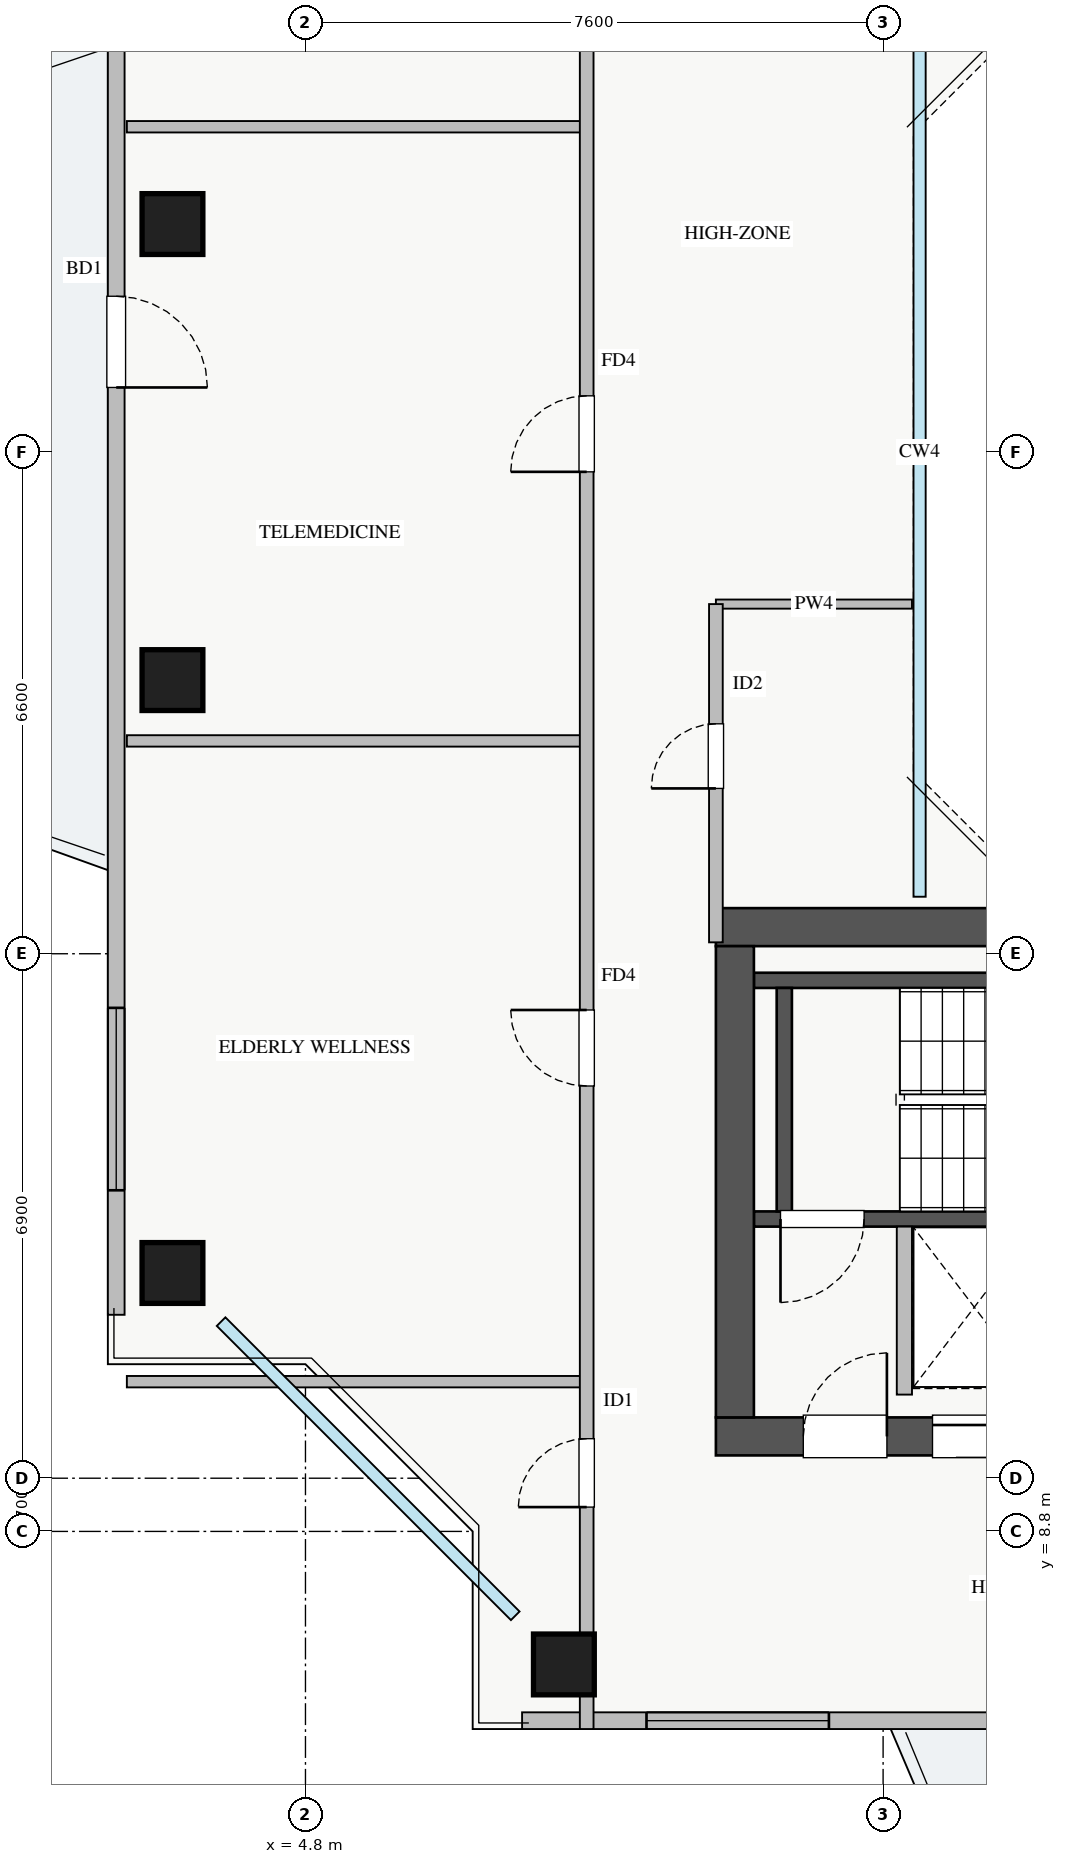
"""IFC4 building model, lengths in metres.
Left out: names, types, materials, properties, quantities, classifications, styles, units other than length and angle.
Written with IfcOpenShell. Run it as: python <this file> out.ifc"""

import sys

from ifc_helpers import new_model, si_unit, direction, frame, frame_2d, origin, origin_2d, place, context, subcontext, project, spatial, rectangle, extrude, source, transform, mapped, element, fill, save


model = new_model("IFC4")
c1 = context("Model", 3, precision=1e-05, world=origin(), true_north=direction((0.0, 1.0)))
c2 = subcontext(c1, "Body", "Model", "MODEL_VIEW")
j1 = project(units=[si_unit("LENGTHUNIT", "METRE"), si_unit("PLANEANGLEUNIT", "RADIAN")], contexts=[c1])
p1 = place(None, origin())
s1 = spatial("IfcSite", under=j1, at=p1, CompositionType="ELEMENT")
p2 = place(p1, origin())
s2 = spatial("IfcBuilding", under=s1, at=p2, CompositionType="ELEMENT")
p3 = place(p2, frame((0.0, 0.0, 219.75)))
s3 = spatial("IfcBuildingStorey", under=s2, at=p3, CompositionType="ELEMENT", Elevation=219.75)
p4 = place(p3, frame((12.68, 12.8, 0.0), z_axis=(0.0, 0.0, 1.0), x_axis=(1.0, 0.0, 0.0)))
e1 = element("IfcWall", 1, at=p4, inside=s3, PredefinedType="SHEAR", context=c2, shape_type="SweptSolid", body=[
    extrude(rectangle(XDim=1.94, YDim=0.18, at=frame_2d((0.97, 0.0))), origin(), (0.0, 0.0, 1.0), 3.07),
])
p5 = place(p3, frame((10.7, 12.91, 0.0), z_axis=(0.0, 0.0, 1.0), x_axis=(1.0, 0.0, 0.0)))
e2 = element("IfcWall", 2, at=p5, inside=s3, PredefinedType="SHEAR", context=c2, shape_type="SweptSolid", body=[
    extrude(rectangle(XDim=7.45, YDim=0.2, at=frame_2d((3.725, 0.0))), origin(), (0.0, 0.0, 1.0), 3.25),
])
p6 = place(p5, frame((0.35, 0.0, 0.0)))
e3 = element("IfcOpeningElement", 3, at=p6, cuts=e2, PredefinedType="OPENING", context=c2, shape_type="SweptSolid", body=[
    extrude(rectangle(XDim=1.1, YDim=2.05, at=frame_2d((0.55, 1.025))), frame((0.0, 0.11, 0.0), z_axis=(0.0, -1.0, 0.0), x_axis=(1.0, 0.0, 0.0)), (0.0, 0.0, 1.0), 0.22),
])
p7 = place(p3, frame((10.7, 16.05, 0.0), z_axis=(0.0, 0.0, 1.0), x_axis=(1.0, 0.0, 0.0)))
e4 = element("IfcWall", 4, at=p7, inside=s3, PredefinedType="SHEAR", context=c2, shape_type="SweptSolid", body=[
    extrude(rectangle(XDim=7.45, YDim=0.2, at=frame_2d((3.725, 0.0))), origin(), (0.0, 0.0, 1.0), 3.25),
])
p8 = place(p3, frame((11.1, 13.01, 0.0), z_axis=(0.0, 0.0, 1.0), x_axis=(0.0, 1.0, 0.0)))
e5 = element("IfcWall", 5, at=p8, inside=s3, PredefinedType="SHEAR", context=c2, shape_type="SweptSolid", body=[
    extrude(rectangle(XDim=2.94, YDim=0.2, at=frame_2d((1.47, 0.0))), origin(), (0.0, 0.0, 1.0), 3.25),
])
p9 = place(p3, frame((10.2, 10.05, 0.0), z_axis=(0.0, 0.0, 1.0), x_axis=(1.0, 0.0, 0.0)))
e6 = element("IfcWall", 6, at=p9, inside=s3, PredefinedType="SHEAR", context=c2, shape_type="SweptSolid", body=[
    extrude(rectangle(XDim=17.6, YDim=0.5, at=frame_2d((8.8, 0.0))), origin(), (0.0, 0.0, 1.0), 3.25),
])
p10 = place(p9, frame((1.15, 0.0, 0.0)))
e7 = element("IfcOpeningElement", 7, at=p10, cuts=e6, PredefinedType="OPENING", context=c2, shape_type="SweptSolid", body=[
    extrude(rectangle(XDim=1.1, YDim=2.05, at=frame_2d((0.55, 1.025))), frame((0.0, 0.26, 0.0), z_axis=(0.0, -1.0, 0.0), x_axis=(1.0, 0.0, 0.0)), (0.0, 0.0, 1.0), 0.52),
])
p11 = place(p9, frame((8.3, 0.0, 0.0)))
e8 = element("IfcOpeningElement", 8, at=p11, cuts=e6, PredefinedType="OPENING", context=c2, shape_type="SweptSolid", body=[
    extrude(rectangle(XDim=1.1, YDim=2.05, at=frame_2d((0.55, 1.025))), frame((0.0, 0.26, 0.0), z_axis=(0.0, -1.0, 0.0), x_axis=(1.0, 0.0, 0.0)), (0.0, 0.0, 1.0), 0.52),
])
p12 = place(p9, frame((2.85, 0.0, 0.0)))
e9 = element("IfcOpeningElement", 9, at=p12, cuts=e6, PredefinedType="OPENING", context=c2, shape_type="SweptSolid", body=[
    extrude(rectangle(XDim=1.1, YDim=2.05, at=frame_2d((0.55, 1.025))), frame((0.0, 0.26, 0.0), z_axis=(0.0, -1.0, 0.0), x_axis=(1.0, 0.0, 0.0)), (0.0, 0.0, 1.0), 0.52),
])
p13 = place(p9, frame((5.8, 0.0, 0.0)))
e10 = element("IfcOpeningElement", 10, at=p13, cuts=e6, PredefinedType="OPENING", context=c2, shape_type="SweptSolid", body=[
    extrude(rectangle(XDim=1.0, YDim=2.05, at=frame_2d((0.5, 1.025))), frame((0.0, 0.26, 0.0), z_axis=(0.0, -1.0, 0.0), x_axis=(1.0, 0.0, 0.0)), (0.0, 0.0, 1.0), 0.52),
])
p14 = place(p9, frame((14.74, 0.0, 0.0)))
e11 = element("IfcOpeningElement", 11, at=p14, cuts=e6, PredefinedType="OPENING", context=c2, shape_type="SweptSolid", body=[
    extrude(rectangle(XDim=1.0, YDim=2.05, at=frame_2d((0.5, 1.025))), frame((0.0, 0.26, 0.0), z_axis=(0.0, -1.0, 0.0), x_axis=(1.0, 0.0, 0.0)), (0.0, 0.0, 1.0), 0.52),
])
p15 = place(p9, frame((10.64, 0.0, 0.0)))
e12 = element("IfcOpeningElement", 12, at=p15, cuts=e6, PredefinedType="OPENING", context=c2, shape_type="SweptSolid", body=[
    extrude(rectangle(XDim=1.0, YDim=2.05, at=frame_2d((0.5, 1.025))), frame((0.0, 0.26, 0.0), z_axis=(0.0, -1.0, 0.0), x_axis=(1.0, 0.0, 0.0)), (0.0, 0.0, 1.0), 0.52),
])
p16 = place(p9, frame((13.09, 0.0, 0.0)))
e13 = element("IfcOpeningElement", 13, at=p16, cuts=e6, PredefinedType="OPENING", context=c2, shape_type="SweptSolid", body=[
    extrude(rectangle(XDim=1.0, YDim=2.05, at=frame_2d((0.5, 1.025))), frame((0.0, 0.26, 0.0), z_axis=(0.0, -1.0, 0.0), x_axis=(1.0, 0.0, 0.0)), (0.0, 0.0, 1.0), 0.52),
])
p17 = place(p3, frame((10.2, 16.75, 0.0), z_axis=(0.0, 0.0, 1.0), x_axis=(1.0, 0.0, 0.0)))
e14 = element("IfcWall", 14, at=p17, inside=s3, PredefinedType="SHEAR", context=c2, shape_type="SweptSolid", body=[
    extrude(rectangle(XDim=17.6, YDim=0.5, at=frame_2d((8.8, 0.0))), origin(), (0.0, 0.0, 1.0), 3.25),
])
p18 = place(p3, frame((10.45, 10.3, 0.0), z_axis=(0.0, 0.0, 1.0), x_axis=(0.0, 1.0, 0.0)))
e15 = element("IfcWall", 15, at=p18, inside=s3, PredefinedType="SHEAR", context=c2, shape_type="SweptSolid", body=[
    extrude(rectangle(XDim=6.2, YDim=0.5, at=frame_2d((3.1, 0.0))), origin(), (0.0, 0.0, 1.0), 3.25),
])
m1 = source(origin(), c2, "Body", "SweptSolid", [
    extrude(rectangle(XDim=0.8, YDim=0.8, at=origin_2d()), origin(), (0.0, 0.0, 1.0), 3.25),
])
for number, where, z_axis, x_axis in (
    (16, (8.2, 7.05, 0.0), (0.0, 0.0, 1.0), (1.0, 0.0, 0.0)),
    (17, (3.05, 26.0, 0.0), (0.0, 0.0, 1.0), (1.0, 0.0, 0.0)),
    (18, (3.05, 20.0, 0.0), (0.0, 0.0, 1.0), (1.0, 0.0, 0.0)),
    (19, (3.05, 12.2, 0.0), (0.0, 0.0, 1.0), (1.0, 0.0, 0.0)),
):
    element("IfcColumn", number, at=place(p3, frame(where, z_axis=z_axis, x_axis=x_axis)), inside=s3, PredefinedType="COLUMN", context=c2, shape_type="MappedRepresentation", body=[
        mapped(m1, transform((0.0, 0.0, 0.0), x_axis=(1.0, 0.0, 0.0), y_axis=(0.0, 1.0, 0.0), z_axis=(0.0, 0.0, 1.0), scale=1.0)),
    ])
p19 = place(p3, frame((7.65, 6.31, 0.0), z_axis=(0.0, 0.0, 1.0), x_axis=(1.0, 0.0, 0.0)))
e20 = element("IfcWall", 20, at=p19, inside=s3, PredefinedType="STANDARD", context=c2, shape_type="SweptSolid", body=[
    extrude(rectangle(XDim=22.7, YDim=0.22, at=frame_2d((11.35, 0.0))), origin(), (0.0, 0.0, 1.0), 2.61),
])
p20 = place(p19, frame((12.2, 0.0, 0.0)))
e21 = element("IfcOpeningElement", 21, at=p20, cuts=e20, PredefinedType="OPENING", context=c2, shape_type="SweptSolid", body=[
    extrude(rectangle(XDim=1.2, YDim=2.1, at=frame_2d((0.6, 1.05))), frame((0.0, 0.12, 0.0), z_axis=(0.0, -1.0, 0.0), x_axis=(1.0, 0.0, 0.0)), (0.0, 0.0, 1.0), 0.24),
])
p21 = place(p19, frame((1.637, 0.0, 0.9)))
e22 = element("IfcOpeningElement", 22, at=p21, cuts=e20, PredefinedType="OPENING", context=c2, shape_type="SweptSolid", body=[
    extrude(rectangle(XDim=2.4, YDim=1.48, at=frame_2d((1.2, 0.74))), frame((0.0, 0.12, 0.0), z_axis=(0.0, -1.0, 0.0), x_axis=(1.0, 0.0, 0.0)), (0.0, 0.0, 1.0), 0.24),
])
p22 = place(p19, frame((7.612, 0.0, 0.9)))
e23 = element("IfcOpeningElement", 23, at=p22, cuts=e20, PredefinedType="OPENING", context=c2, shape_type="SweptSolid", body=[
    extrude(rectangle(XDim=1.8, YDim=1.45, at=frame_2d((0.9, 0.725))), frame((0.0, 0.12, 0.0), z_axis=(0.0, -1.0, 0.0), x_axis=(1.0, 0.0, 0.0)), (0.0, 0.0, 1.0), 0.24),
])
p23 = place(p19, frame((20.137, 0.0, 0.9)))
e24 = element("IfcOpeningElement", 24, at=p23, cuts=e20, PredefinedType="OPENING", context=c2, shape_type="SweptSolid", body=[
    extrude(rectangle(XDim=2.1, YDim=1.5, at=frame_2d((1.05, 0.75))), frame((0.0, 0.12, 0.0), z_axis=(0.0, -1.0, 0.0), x_axis=(1.0, 0.0, 0.0)), (0.0, 0.0, 1.0), 0.24),
])
p24 = place(p19, frame((16.72, 0.0, 0.9)))
e25 = element("IfcOpeningElement", 25, at=p24, cuts=e20, PredefinedType="OPENING", context=c2, shape_type="SweptSolid", body=[
    extrude(rectangle(XDim=2.4, YDim=1.5, at=frame_2d((1.2, 0.75))), frame((0.0, 0.12, 0.0), z_axis=(0.0, -1.0, 0.0), x_axis=(1.0, 0.0, 0.0)), (0.0, 0.0, 1.0), 0.24),
])
p25 = place(p3, frame((2.31, 11.65, 0.0), z_axis=(0.0, 0.0, 1.0), x_axis=(0.0, 1.0, 0.0)))
e26 = element("IfcWall", 26, at=p25, inside=s3, PredefinedType="STANDARD", context=c2, shape_type="SweptSolid", body=[
    extrude(rectangle(XDim=22.7, YDim=0.22, at=frame_2d((11.35, 0.0))), origin(), (0.0, 0.0, 1.0), 2.61),
])
p26 = place(p25, frame((12.2, 0.0, 0.0)))
e27 = element("IfcOpeningElement", 27, at=p26, cuts=e26, PredefinedType="OPENING", context=c2, shape_type="SweptSolid", body=[
    extrude(rectangle(XDim=1.2, YDim=2.1, at=frame_2d((0.6, 1.05))), frame((0.0, 0.12, 0.0), z_axis=(0.0, -1.0, 0.0), x_axis=(1.0, 0.0, 0.0)), (0.0, 0.0, 1.0), 0.24),
])
p27 = place(p25, frame((1.638, 0.0, 0.9)))
e28 = element("IfcOpeningElement", 28, at=p27, cuts=e26, PredefinedType="OPENING", context=c2, shape_type="SweptSolid", body=[
    extrude(rectangle(XDim=2.4, YDim=1.48, at=frame_2d((1.2, 0.74))), frame((0.0, 0.12, 0.0), z_axis=(0.0, -1.0, 0.0), x_axis=(1.0, 0.0, 0.0)), (0.0, 0.0, 1.0), 0.24),
])
p28 = place(p25, frame((18.813, 0.0, 0.9)))
e29 = element("IfcOpeningElement", 29, at=p28, cuts=e26, PredefinedType="OPENING", context=c2, shape_type="SweptSolid", body=[
    extrude(rectangle(XDim=2.1, YDim=1.48, at=frame_2d((1.05, 0.74))), frame((0.0, 0.12, 0.0), z_axis=(0.0, -1.0, 0.0), x_axis=(1.0, 0.0, 0.0)), (0.0, 0.0, 1.0), 0.24),
])
p29 = place(p3, frame((12.68, 10.6, 0.0), z_axis=(0.0, 0.0, 1.0), x_axis=(0.0, 1.0, 0.0)))
e30 = element("IfcWall", 30, at=p29, inside=s3, PredefinedType="PARTITIONING", context=c2, shape_type="SweptSolid", body=[
    extrude(rectangle(XDim=2.21, YDim=0.2, at=frame_2d((1.105, 0.0))), origin(), (0.0, 0.0, 1.0), 3.07),
])
for number, where, z_axis, x_axis in (
    (31, (2.45, 10.77, 0.0), (0.0, 0.0, 1.0), (1.0, 0.0, 0.0)),
    (32, (2.45, 19.2, 0.0), (0.0, 0.0, 1.0), (1.0, 0.0, 0.0)),
    (33, (2.45, 27.28, 0.0), (0.0, 0.0, 1.0), (1.0, 0.0, 0.0)),
):
    element("IfcWall", number, at=place(p3, frame(where, z_axis=z_axis, x_axis=x_axis)), inside=s3, PredefinedType="PARTITIONING", context=c2, shape_type="SweptSolid", body=[
        extrude(rectangle(XDim=6.05, YDim=0.15, at=frame_2d((3.025, 0.0))), origin(), (0.0, 0.0, 1.0), 3.07),
    ])
p30 = place(p3, frame((8.5, 6.2, 0.0), z_axis=(0.0, 0.0, 1.0), x_axis=(0.0, 1.0, 0.0)))
e34 = element("IfcWall", 34, at=p30, inside=s3, PredefinedType="PARTITIONING", context=c2, shape_type="SweptSolid", body=[
    extrude(rectangle(XDim=33.6, YDim=0.18, at=frame_2d((16.8, 0.0))), origin(), (0.0, 0.0, 1.0), 3.07),
])
p31 = place(p30, frame((29.605, 0.0, 0.0)))
e35 = element("IfcOpeningElement", 35, at=p31, cuts=e34, PredefinedType="OPENING", context=c2, shape_type="SweptSolid", body=[
    extrude(rectangle(XDim=0.9, YDim=2.05, at=frame_2d((0.45, 1.025))), frame((0.0, 0.1, 0.0), z_axis=(0.0, -1.0, 0.0), x_axis=(1.0, 0.0, 0.0)), (0.0, 0.0, 1.0), 0.2),
])
p32 = place(p30, frame((2.92, 0.0, 0.0)))
e36 = element("IfcOpeningElement", 36, at=p32, cuts=e34, PredefinedType="OPENING", context=c2, shape_type="SweptSolid", body=[
    extrude(rectangle(XDim=0.9, YDim=2.05, at=frame_2d((0.45, 1.025))), frame((0.0, 0.1, 0.0), z_axis=(0.0, -1.0, 0.0), x_axis=(1.0, 0.0, 0.0)), (0.0, 0.0, 1.0), 0.2),
])
p33 = place(p30, frame((8.46, 0.0, 0.0)))
e37 = element("IfcOpeningElement", 37, at=p33, cuts=e34, PredefinedType="OPENING", context=c2, shape_type="SweptSolid", body=[
    extrude(rectangle(XDim=1.0, YDim=2.05, at=frame_2d((0.5, 1.025))), frame((0.0, 0.1, 0.0), z_axis=(0.0, -1.0, 0.0), x_axis=(1.0, 0.0, 0.0)), (0.0, 0.0, 1.0), 0.2),
])
p34 = place(p30, frame((16.54, 0.0, 0.0)))
e38 = element("IfcOpeningElement", 38, at=p34, cuts=e34, PredefinedType="OPENING", context=c2, shape_type="SweptSolid", body=[
    extrude(rectangle(XDim=1.0, YDim=2.05, at=frame_2d((0.5, 1.025))), frame((0.0, 0.1, 0.0), z_axis=(0.0, -1.0, 0.0), x_axis=(1.0, 0.0, 0.0)), (0.0, 0.0, 1.0), 0.2),
])
p35 = place(p30, frame((24.38, 0.0, 0.0)))
e39 = element("IfcOpeningElement", 39, at=p35, cuts=e34, PredefinedType="OPENING", context=c2, shape_type="SweptSolid", body=[
    extrude(rectangle(XDim=1.0, YDim=2.05, at=frame_2d((0.5, 1.025))), frame((0.0, 0.1, 0.0), z_axis=(0.0, -1.0, 0.0), x_axis=(1.0, 0.0, 0.0)), (0.0, 0.0, 1.0), 0.2),
])
p36 = place(p3, frame((10.2, 21.0, 0.0), z_axis=(0.0, 0.0, 1.0), x_axis=(1.0, 0.0, 0.0)))
e40 = element("IfcWall", 40, at=p36, inside=s3, PredefinedType="PLUMBINGWALL", context=c2, shape_type="SweptSolid", body=[
    extrude(rectangle(XDim=2.58, YDim=0.12, at=frame_2d((1.29, 0.0))), origin(), (0.0, 0.0, 1.0), 3.07),
])
p37 = place(p3, frame((10.2, 16.55, 0.0), z_axis=(0.0, 0.0, 1.0), x_axis=(0.0, 1.0, 0.0)))
e41 = element("IfcWall", 41, at=p37, inside=s3, PredefinedType="PARTITIONING", context=c2, shape_type="SweptSolid", body=[
    extrude(rectangle(XDim=4.45, YDim=0.18, at=frame_2d((2.225, 0.0))), origin(), (0.0, 0.0, 1.0), 3.07),
])
p38 = place(p37, frame((2.025, 0.0, 0.0)))
e42 = element("IfcOpeningElement", 42, at=p38, cuts=e41, PredefinedType="OPENING", context=c2, shape_type="SweptSolid", body=[
    extrude(rectangle(XDim=0.85, YDim=2.05, at=frame_2d((0.425, 1.025))), frame((0.0, 0.1, 0.0), z_axis=(0.0, -1.0, 0.0), x_axis=(1.0, 0.0, 0.0)), (0.0, 0.0, 1.0), 0.2),
])
m2 = source(origin(), c2, "Body", "SweptSolid", [
    extrude(rectangle(XDim=2.4, YDim=1.48, at=frame_2d((1.2, 0.74))), frame((0.0, 0.03, 0.0), z_axis=(0.0, -1.0, 0.0), x_axis=(1.0, 0.0, 0.0)), (0.0, 0.0, 1.0), 0.06),
])
p39 = place(p21, origin())
e43 = element("IfcWindow", 43, at=p39, inside=s3, PartitioningType="TRIPLE_PANEL_VERTICAL", PredefinedType="WINDOW", context=c2, shape_type="MappedRepresentation", body=[
    mapped(m2, transform((0.0, 0.0, 0.0), x_axis=(1.0, 0.0, 0.0), y_axis=(0.0, 1.0, 0.0), z_axis=(0.0, 0.0, 1.0), scale=1.0)),
])
fill(e22, e43)
m3 = source(origin(), c2, "Body", "SweptSolid", [
    extrude(rectangle(XDim=1.2, YDim=2.1, at=frame_2d((0.6, 1.05))), frame((0.0, 0.025, 0.0), z_axis=(0.0, -1.0, 0.0), x_axis=(1.0, 0.0, 0.0)), (0.0, 0.0, 1.0), 0.05),
])
p40 = place(p26, frame((1.2, 0.0, 0.0), z_axis=(0.0, 0.0, 1.0), x_axis=(-1.0, 0.0, 0.0)))
e44 = element("IfcDoor", 44, at=p40, inside=s3, OperationType="SINGLE_SWING_LEFT", PredefinedType="DOOR", context=c2, shape_type="MappedRepresentation", body=[
    mapped(m3, transform((0.0, 0.0, 0.0), x_axis=(1.0, 0.0, 0.0), y_axis=(0.0, 1.0, 0.0), z_axis=(0.0, 0.0, 1.0), scale=1.0)),
])
fill(e27, e44)
p41 = place(p27, origin())
e45 = element("IfcWindow", 45, at=p41, inside=s3, PartitioningType="TRIPLE_PANEL_VERTICAL", PredefinedType="WINDOW", context=c2, shape_type="MappedRepresentation", body=[
    mapped(m2, transform((0.0, 0.0, 0.0), x_axis=(1.0, 0.0, 0.0), y_axis=(0.0, 1.0, 0.0), z_axis=(0.0, 0.0, 1.0), scale=1.0)),
])
fill(e28, e45)
m4 = source(origin(), c2, "Body", "SweptSolid", [
    extrude(rectangle(XDim=1.1, YDim=2.05, at=frame_2d((0.55, 1.025))), frame((0.0, 0.025, 0.0), z_axis=(0.0, -1.0, 0.0), x_axis=(1.0, 0.0, 0.0)), (0.0, 0.0, 1.0), 0.05),
])
p42 = place(p10, origin())
e46 = element("IfcDoor", 46, at=p42, inside=s3, OperationType="SINGLE_SWING_RIGHT", PredefinedType="DOOR", context=c2, shape_type="MappedRepresentation", body=[
    mapped(m4, transform((0.0, 0.0, 0.0), x_axis=(1.0, 0.0, 0.0), y_axis=(0.0, 1.0, 0.0), z_axis=(0.0, 0.0, 1.0), scale=1.0)),
])
fill(e7, e46)
p43 = place(p6, frame((1.1, 0.0, 0.0), z_axis=(0.0, 0.0, 1.0), x_axis=(-1.0, 0.0, 0.0)))
e47 = element("IfcDoor", 47, at=p43, inside=s3, OperationType="SINGLE_SWING_LEFT", PredefinedType="DOOR", context=c2, shape_type="MappedRepresentation", body=[
    mapped(m4, transform((0.0, 0.0, 0.0), x_axis=(1.0, 0.0, 0.0), y_axis=(0.0, 1.0, 0.0), z_axis=(0.0, 0.0, 1.0), scale=1.0)),
])
fill(e3, e47)
p44 = place(p12, origin())
e48 = element("IfcDoor", 48, at=p44, inside=s3, OperationType="SLIDING_TO_RIGHT", PredefinedType="DOOR", context=c2, shape_type="MappedRepresentation", body=[
    mapped(m4, transform((0.0, 0.0, 0.0), x_axis=(1.0, 0.0, 0.0), y_axis=(0.0, 1.0, 0.0), z_axis=(0.0, 0.0, 1.0), scale=1.0)),
])
fill(e9, e48)
m5 = source(origin(), c2, "Body", "SweptSolid", [
    extrude(rectangle(XDim=0.9, YDim=2.05, at=frame_2d((0.45, 1.025))), frame((0.0, 0.025, 0.0), z_axis=(0.0, -1.0, 0.0), x_axis=(1.0, 0.0, 0.0)), (0.0, 0.0, 1.0), 0.05),
])
p45 = place(p32, origin())
e49 = element("IfcDoor", 49, at=p45, inside=s3, OperationType="SINGLE_SWING_LEFT", PredefinedType="DOOR", context=c2, shape_type="MappedRepresentation", body=[
    mapped(m5, transform((0.0, 0.0, 0.0), x_axis=(1.0, 0.0, 0.0), y_axis=(0.0, 1.0, 0.0), z_axis=(0.0, 0.0, 1.0), scale=1.0)),
])
fill(e36, e49)
m6 = source(origin(), c2, "Body", "SweptSolid", [
    extrude(rectangle(XDim=1.0, YDim=2.05, at=frame_2d((0.5, 1.025))), frame((0.0, 0.025, 0.0), z_axis=(0.0, -1.0, 0.0), x_axis=(1.0, 0.0, 0.0)), (0.0, 0.0, 1.0), 0.05),
])
p46 = place(p33, origin())
e50 = element("IfcDoor", 50, at=p46, inside=s3, OperationType="SINGLE_SWING_RIGHT", PredefinedType="DOOR", context=c2, shape_type="MappedRepresentation", body=[
    mapped(m6, transform((0.0, 0.0, 0.0), x_axis=(1.0, 0.0, 0.0), y_axis=(0.0, 1.0, 0.0), z_axis=(0.0, 0.0, 1.0), scale=1.0)),
])
fill(e37, e50)
p47 = place(p34, origin())
e51 = element("IfcDoor", 51, at=p47, inside=s3, OperationType="SINGLE_SWING_LEFT", PredefinedType="DOOR", context=c2, shape_type="MappedRepresentation", body=[
    mapped(m6, transform((0.0, 0.0, 0.0), x_axis=(1.0, 0.0, 0.0), y_axis=(0.0, 1.0, 0.0), z_axis=(0.0, 0.0, 1.0), scale=1.0)),
])
fill(e38, e51)
m7 = source(origin(), c2, "Body", "SweptSolid", [
    extrude(rectangle(XDim=0.85, YDim=2.05, at=frame_2d((0.425, 1.025))), frame((0.0, 0.025, 0.0), z_axis=(0.0, -1.0, 0.0), x_axis=(1.0, 0.0, 0.0)), (0.0, 0.0, 1.0), 0.05),
])
p48 = place(p38, origin())
e52 = element("IfcDoor", 52, at=p48, inside=s3, OperationType="SINGLE_SWING_LEFT", PredefinedType="DOOR", context=c2, shape_type="MappedRepresentation", body=[
    mapped(m7, transform((0.0, 0.0, 0.0), x_axis=(1.0, 0.0, 0.0), y_axis=(0.0, 1.0, 0.0), z_axis=(0.0, 0.0, 1.0), scale=1.0)),
])
fill(e42, e52)
save(model, sys.argv[1])
